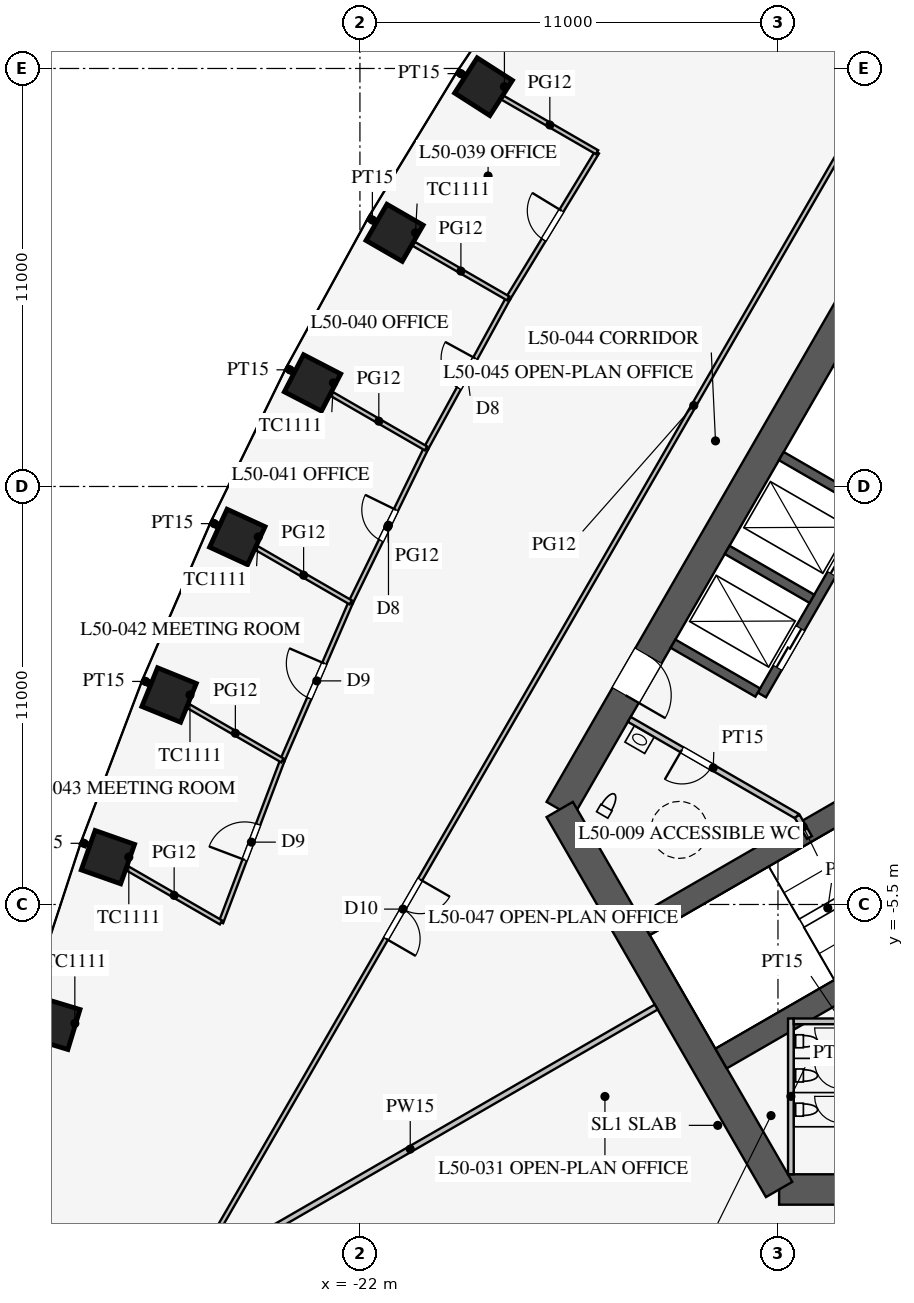
"""IFC4 building model, lengths in metres.
Left out: names, types, materials, properties, quantities, classifications, styles, units other than length and angle.
Written with IfcOpenShell. Run it as: python <this file> out.ifc"""

import sys

from ifc_helpers import new_model, si_unit, direction, frame, frame_2d, origin, origin_2d, place, context, subcontext, project, spatial, rectangle, extrude, element, fill, save


model = new_model("IFC4")
c1 = context("Model", 3, precision=1e-05, world=origin(), true_north=direction((0.0, 1.0)))
c2 = subcontext(c1, "Body", "Model", "MODEL_VIEW")
j1 = project(units=[si_unit("LENGTHUNIT", "METRE"), si_unit("PLANEANGLEUNIT", "RADIAN")], contexts=[c1])
p1 = place(None, origin())
s1 = spatial("IfcSite", under=j1, at=p1, CompositionType="ELEMENT")
p2 = place(p1, origin())
s2 = spatial("IfcBuilding", under=s1, at=p2, CompositionType="ELEMENT")
p3 = place(p2, frame((0.0, 0.0, 219.1)))
s3 = spatial("IfcBuildingStorey", under=s2, at=p3, CompositionType="ELEMENT", Elevation=219.1)
for number, where, z_axis, x_axis in (
    (1, (-18.748, 16.02, 0.0), (0.0, 0.0, 1.0), (-0.539, -0.842, 0.0)),
    (2, (-21.088, 12.175, 0.0), (0.0, 0.0, 1.0), (-0.5, -0.866, 0.0)),
    (3, (-23.248, 8.226, 0.0), (0.0, 0.0, 1.0), (-0.46, -0.888, 0.0)),
    (4, (-25.227, 4.172, 0.0), (0.0, 0.0, 1.0), (-0.418, -0.908, 0.0)),
    (5, (-27.022, 0.013, 0.0), (0.0, 0.0, 1.0), (-0.376, -0.927, 0.0)),
    (6, (-28.632, -4.254, 0.0), (0.0, 0.0, 1.0), (-0.332, -0.943, 0.0)),
    (7, (-30.052, -8.63, 0.0), (0.0, 0.0, 1.0), (-0.29, -0.957, 0.0)),
):
    element("IfcColumn", number, at=place(p3, frame(where, z_axis=z_axis, x_axis=x_axis)), inside=s3, PredefinedType="COLUMN", context=c2, shape_type="SweptSolid", body=[
        extrude(rectangle(XDim=1.1, YDim=1.1, at=origin_2d()), origin(), (0.0, 0.0, 1.0), 4.2),
    ])
p4 = place(p3, frame((-10.97, -13.0, 0.0), z_axis=(0.0, 0.0, 1.0), x_axis=(1.0, 0.0, 0.0)))
e8 = element("IfcWall", 8, at=p4, inside=s3, PredefinedType="SHEAR", context=c2, shape_type="SweptSolid", body=[
    extrude(rectangle(XDim=21.939, YDim=0.8, at=frame_2d((10.97, 0.0))), origin(), (0.0, 0.0, 1.0), 4.2),
])
p5 = place(p4, frame((17.27, 0.0, 0.0)))
e9 = element("IfcOpeningElement", 9, at=p5, cuts=e8, PredefinedType="OPENING", context=c2, shape_type="SweptSolid", body=[
    extrude(rectangle(XDim=1.2, YDim=2.1, at=frame_2d((0.6, 1.05))), frame((0.0, 0.41, 0.0), z_axis=(0.0, -1.0, 0.0), x_axis=(1.0, 0.0, 0.0)), (0.0, 0.0, 1.0), 0.82),
])
p6 = place(p4, frame((3.47, 0.0, 0.0)))
e10 = element("IfcOpeningElement", 10, at=p6, cuts=e8, PredefinedType="OPENING", context=c2, shape_type="SweptSolid", body=[
    extrude(rectangle(XDim=1.2, YDim=2.1, at=frame_2d((0.6, 1.05))), frame((0.0, 0.41, 0.0), z_axis=(0.0, -1.0, 0.0), x_axis=(1.0, 0.0, 0.0)), (0.0, 0.0, 1.0), 0.82),
])
p7 = place(p3, frame((-5.773, 16.0, 0.0), z_axis=(0.0, 0.0, 1.0), x_axis=(-0.500002442456, -0.866023993627, 0.0)))
e11 = element("IfcWall", 11, at=p7, inside=s3, PredefinedType="SHEAR", context=c2, shape_type="SweptSolid", body=[
    extrude(rectangle(XDim=21.939, YDim=0.8, at=frame_2d((10.97, 0.0))), origin(), (0.0, 0.0, 1.0), 4.2),
])
p8 = place(p7, frame((17.27, 0.0, 0.0)))
e12 = element("IfcOpeningElement", 12, at=p8, cuts=e11, PredefinedType="OPENING", context=c2, shape_type="SweptSolid", body=[
    extrude(rectangle(XDim=1.2, YDim=2.1, at=frame_2d((0.6, 1.05))), frame((0.0, 0.41, 0.0), z_axis=(0.0, -1.0, 0.0), x_axis=(1.0, 0.0, 0.0)), (0.0, 0.0, 1.0), 0.82),
])
p9 = place(p7, frame((3.47, 0.0, 0.0)))
e13 = element("IfcOpeningElement", 13, at=p9, cuts=e11, PredefinedType="OPENING", context=c2, shape_type="SweptSolid", body=[
    extrude(rectangle(XDim=1.2, YDim=2.1, at=frame_2d((0.6, 1.05))), frame((0.0, 0.41, 0.0), z_axis=(0.0, -1.0, 0.0), x_axis=(1.0, 0.0, 0.0)), (0.0, 0.0, 1.0), 0.82),
])
p10 = place(p3, frame((-16.743, -3.0, 0.0), z_axis=(0.0, 0.0, 1.0), x_axis=(0.499995765644, -0.866027848477, 0.0)))
e14 = element("IfcWall", 14, at=p10, inside=s3, PredefinedType="SHEAR", context=c2, shape_type="SweptSolid", body=[
    extrude(rectangle(XDim=11.547, YDim=0.8, at=frame_2d((5.773, 0.0))), origin(), (0.0, 0.0, 1.0), 4.2),
])
p11 = place(p3, frame((-5.724, 9.886, 0.0), z_axis=(0.0, 0.0, 1.0), x_axis=(-0.500001763848, -0.866024385424, 0.0)))
e15 = element("IfcWall", 15, at=p11, inside=s3, PredefinedType="SHEAR", context=c2, shape_type="SweptSolid", body=[
    extrude(rectangle(XDim=11.4, YDim=0.25, at=frame_2d((5.7, 0.0))), origin(), (0.0, 0.0, 1.0), 4.2),
])
p12 = place(p11, frame((6.525, 0.0, 0.0)))
e16 = element("IfcOpeningElement", 16, at=p12, cuts=e15, PredefinedType="OPENING", context=c2, shape_type="SweptSolid", body=[
    extrude(rectangle(XDim=1.2, YDim=2.2, at=frame_2d((0.6, 1.1))), frame((0.0, 0.135, 0.0), z_axis=(0.0, -1.0, 0.0), x_axis=(1.0, 0.0, 0.0)), (0.0, 0.0, 1.0), 0.27),
])
p13 = place(p11, frame((9.375, 0.0, 0.0)))
e17 = element("IfcOpeningElement", 17, at=p13, cuts=e15, PredefinedType="OPENING", context=c2, shape_type="SweptSolid", body=[
    extrude(rectangle(XDim=1.2, YDim=2.2, at=frame_2d((0.6, 1.1))), frame((0.0, 0.135, 0.0), z_axis=(0.0, -1.0, 0.0), x_axis=(1.0, 0.0, 0.0)), (0.0, 0.0, 1.0), 0.27),
])
for number, where, z_axis, x_axis in (
    (18, (-7.257, 7.481, 0.0), (0.0, 0.0, 1.0), (-0.866, 0.5, 0.0)),
    (19, (-8.682, 5.012, 0.0), (0.0, 0.0, 1.0), (-0.866, 0.5, 0.0)),
    (20, (-10.107, 2.544, 0.0), (0.0, 0.0, 1.0), (-0.866, 0.5, 0.0)),
    (21, (-11.532, 0.076, 0.0), (0.0, 0.0, 1.0), (-0.866, 0.5, 0.0)),
):
    element("IfcWall", number, at=place(p3, frame(where, z_axis=z_axis, x_axis=x_axis)), inside=s3, PredefinedType="SHEAR", context=c2, shape_type="SweptSolid", body=[
        extrude(rectangle(XDim=2.575, YDim=0.25, at=frame_2d((1.288, 0.0))), origin(), (0.0, 0.0, 1.0), 4.2),
    ])
for number, where, z_axis, x_axis in (
    (22, (-6.663, -1.509, 0.0), (0.0, 0.0, 1.0), (-0.866, -0.5, 0.0)),
    (23, (-4.638, -5.016, 0.0), (0.0, 0.0, 1.0), (-0.866, -0.5, 0.0)),
):
    element("IfcWall", number, at=place(p3, frame(where, z_axis=z_axis, x_axis=x_axis)), inside=s3, PredefinedType="SHEAR", context=c2, shape_type="SweptSolid", body=[
        extrude(rectangle(XDim=9.075, YDim=0.6, at=frame_2d((4.538, 0.0))), origin(), (0.0, 0.0, 1.0), 4.2),
    ])
p14 = place(p3, frame((-10.495, -3.178, 0.0), z_axis=(0.0, 0.0, 1.0), x_axis=(-0.86602216432, 0.500005610874, 0.0)))
e24 = element("IfcWall", 24, at=p14, inside=s3, PredefinedType="PARTITIONING", context=c2, shape_type="SweptSolid", body=[
    extrude(rectangle(XDim=5.1, YDim=0.15, at=frame_2d((2.55, 0.0))), origin(), (0.0, 0.0, 1.0), 4.0),
])
p15 = place(p14, frame((2.6, 0.0, 0.0)))
e25 = element("IfcOpeningElement", 25, at=p15, cuts=e24, PredefinedType="OPENING", context=c2, shape_type="SweptSolid", body=[
    extrude(rectangle(XDim=0.9, YDim=2.1, at=frame_2d((0.45, 1.05))), frame((0.0, 0.085, 0.0), z_axis=(0.0, -1.0, 0.0), x_axis=(1.0, 0.0, 0.0)), (0.0, 0.0, 1.0), 0.17),
])
p16 = place(p3, frame((-10.495, -3.178, 0.0), z_axis=(0.0, 0.0, 1.0), x_axis=(0.499842556608, -0.866116284689, 0.0)))
e26 = element("IfcWall", 26, at=p16, inside=s3, PredefinedType="PARTITIONING", context=c2, shape_type="SweptSolid", body=[
    extrude(rectangle(XDim=0.645, YDim=0.15, at=frame_2d((0.323, 0.0))), origin(), (0.0, 0.0, 1.0), 4.0),
])
p17 = place(p3, frame((-10.66, -8.5, 0.0), z_axis=(0.0, 0.0, 1.0), x_axis=(0.0, -1.0, 0.0)))
e27 = element("IfcWall", 27, at=p17, inside=s3, PredefinedType="PARTITIONING", context=c2, shape_type="SweptSolid", body=[
    extrude(rectangle(XDim=4.1, YDim=0.15, at=frame_2d((2.05, 0.0))), origin(), (0.0, 0.0, 1.0), 4.0),
])
p18 = place(p3, frame((-8.075, -8.575, 0.0), z_axis=(0.0, 0.0, 1.0), x_axis=(-1.0, 0.0, 0.0)))
e28 = element("IfcWall", 28, at=p18, inside=s3, PredefinedType="PARTITIONING", context=c2, shape_type="SweptSolid", body=[
    extrude(rectangle(XDim=2.51, YDim=0.15, at=frame_2d((1.255, 0.0))), origin(), (0.0, 0.0, 1.0), 4.0),
])
p19 = place(p3, frame((-14.203, -8.2, 0.0), z_axis=(0.0, 0.0, 1.0), x_axis=(-0.866021600284, -0.500006587798, 0.0)))
e29 = element("IfcWall", 29, at=p19, inside=s3, PredefinedType="PARTITIONING", context=c2, shape_type="SweptSolid", body=[
    extrude(rectangle(XDim=14.95, YDim=0.15, at=frame_2d((7.475, 0.0))), origin(), (0.0, 0.0, 1.0), 2.4),
])
p20 = place(p3, frame((-0.016, 30.491, 0.0), z_axis=(0.0, 0.0, 1.0), x_axis=(-0.50000091641, -0.866024874695, 0.0)))
e30 = element("IfcWall", 30, at=p20, inside=s3, PredefinedType="PARTITIONING", context=c2, shape_type="SweptSolid", body=[
    extrude(rectangle(XDim=52.796, YDim=0.12, at=frame_2d((26.398, 0.0))), origin(), (0.0, 0.0, 1.0), 2.9),
])
p21 = place(p20, frame((10.2, 0.0, 0.15)))
e31 = element("IfcOpeningElement", 31, at=p21, cuts=e30, PredefinedType="OPENING", context=c2, shape_type="SweptSolid", body=[
    extrude(rectangle(XDim=1.8, YDim=2.1, at=frame_2d((0.9, 1.05))), frame((0.0, 0.07, 0.0), z_axis=(0.0, -1.0, 0.0), x_axis=(1.0, 0.0, 0.0)), (0.0, 0.0, 1.0), 0.14),
])
p22 = place(p20, frame((40.8, 0.0, 0.15)))
e32 = element("IfcOpeningElement", 32, at=p22, cuts=e30, PredefinedType="OPENING", context=c2, shape_type="SweptSolid", body=[
    extrude(rectangle(XDim=1.8, YDim=2.1, at=frame_2d((0.9, 1.05))), frame((0.0, 0.07, 0.0), z_axis=(0.0, -1.0, 0.0), x_axis=(1.0, 0.0, 0.0)), (0.0, 0.0, 1.0), 0.14),
])
p23 = place(p3, frame((-21.568, 12.452, 0.0), z_axis=(0.0, 0.0, 1.0), x_axis=(-0.866303639744, 0.499517771221, 0.0)))
e33 = element("IfcWall", 33, at=p23, inside=s3, PredefinedType="PARTITIONING", context=c2, shape_type="SweptSolid", body=[
    extrude(rectangle(XDim=0.241, YDim=0.15, at=frame_2d((0.121, 0.0))), origin(), (0.0, 0.0, 1.0), 2.9),
])
p24 = place(p3, frame((-27.563, 0.325, 0.0), z_axis=(0.0, 0.0, 1.0), x_axis=(-0.865614066289, 0.500711781609, 0.0)))
e34 = element("IfcWall", 34, at=p24, inside=s3, PredefinedType="PARTITIONING", context=c2, shape_type="SweptSolid", body=[
    extrude(rectangle(XDim=0.178, YDim=0.15, at=frame_2d((0.089, 0.0))), origin(), (0.0, 0.0, 1.0), 2.9),
])
p25 = place(p3, frame((-29.191, -3.931, 0.0), z_axis=(0.0, 0.0, 1.0), x_axis=(-0.866484919499, 0.499203249469, 0.0)))
e35 = element("IfcWall", 35, at=p25, inside=s3, PredefinedType="PARTITIONING", context=c2, shape_type="SweptSolid", body=[
    extrude(rectangle(XDim=0.163, YDim=0.15, at=frame_2d((0.082, 0.0))), origin(), (0.0, 0.0, 1.0), 2.9),
])
p26 = place(p3, frame((-23.749, 8.515, 0.0), z_axis=(0.0, 0.0, 1.0), x_axis=(-0.865810949009, 0.500371262739, 0.0)))
e36 = element("IfcWall", 36, at=p26, inside=s3, PredefinedType="PARTITIONING", context=c2, shape_type="SweptSolid", body=[
    extrude(rectangle(XDim=0.217, YDim=0.15, at=frame_2d((0.108, 0.0))), origin(), (0.0, 0.0, 1.0), 2.9),
])
p27 = place(p3, frame((-25.748, 4.473, 0.0), z_axis=(0.0, 0.0, 1.0), x_axis=(-0.865625187776, 0.500692554656, 0.0)))
e37 = element("IfcWall", 37, at=p27, inside=s3, PredefinedType="PARTITIONING", context=c2, shape_type="SweptSolid", body=[
    extrude(rectangle(XDim=0.196, YDim=0.15, at=frame_2d((0.098, 0.0))), origin(), (0.0, 0.0, 1.0), 2.9),
])
p28 = place(p3, frame((-19.249, 16.31, 0.0), z_axis=(0.0, 0.0, 1.0), x_axis=(-0.865810949009, 0.500371262739, 0.0)))
e38 = element("IfcWall", 38, at=p28, inside=s3, PredefinedType="PARTITIONING", context=c2, shape_type="SweptSolid", body=[
    extrude(rectangle(XDim=0.217, YDim=0.15, at=frame_2d((0.108, 0.0))), origin(), (0.0, 0.0, 1.0), 2.9),
])
p29 = place(p3, frame((-18.101, 10.45, 0.0), z_axis=(0.0, 0.0, 1.0), x_axis=(-0.479949984371, -0.877295852322, 0.0)))
e39 = element("IfcWall", 39, at=p29, inside=s3, PredefinedType="PARTITIONING", context=c2, shape_type="SweptSolid", body=[
    extrude(rectangle(XDim=4.501, YDim=0.12, at=frame_2d((2.25, 0.0))), origin(), (0.0, 0.0, 1.0), 2.9),
])
p30 = place(p29, frame((1.8, 0.0, 0.15)))
e40 = element("IfcOpeningElement", 40, at=p30, cuts=e39, PredefinedType="OPENING", context=c2, shape_type="SweptSolid", body=[
    extrude(rectangle(XDim=0.9, YDim=2.1, at=frame_2d((0.45, 1.05))), frame((0.0, 0.07, 0.0), z_axis=(0.0, -1.0, 0.0), x_axis=(1.0, 0.0, 0.0)), (0.0, 0.0, 1.0), 0.14),
])
p31 = place(p3, frame((-24.041, -1.708, 0.0), z_axis=(0.0, 0.0, 1.0), x_axis=(-0.3542667952, -0.935144394101, 0.0)))
e41 = element("IfcWall", 41, at=p31, inside=s3, PredefinedType="PARTITIONING", context=c2, shape_type="SweptSolid", body=[
    extrude(rectangle(XDim=4.559, YDim=0.12, at=frame_2d((2.28, 0.0))), origin(), (0.0, 0.0, 1.0), 2.9),
])
p32 = place(p31, frame((1.8, 0.0, 0.15)))
e42 = element("IfcOpeningElement", 42, at=p32, cuts=e41, PredefinedType="OPENING", context=c2, shape_type="SweptSolid", body=[
    extrude(rectangle(XDim=1.0, YDim=2.1, at=frame_2d((0.5, 1.05))), frame((0.0, 0.07, 0.0), z_axis=(0.0, -1.0, 0.0), x_axis=(1.0, 0.0, 0.0)), (0.0, 0.0, 1.0), 0.14),
])
p33 = place(p3, frame((-20.261, 6.501, 0.0), z_axis=(0.0, 0.0, 1.0), x_axis=(-0.43911984878, -0.898428493764, 0.0)))
e43 = element("IfcWall", 43, at=p33, inside=s3, PredefinedType="PARTITIONING", context=c2, shape_type="SweptSolid", body=[
    extrude(rectangle(XDim=4.511, YDim=0.12, at=frame_2d((2.255, 0.0))), origin(), (0.0, 0.0, 1.0), 2.9),
])
p34 = place(p33, frame((1.8, 0.0, 0.15)))
e44 = element("IfcOpeningElement", 44, at=p34, cuts=e43, PredefinedType="OPENING", context=c2, shape_type="SweptSolid", body=[
    extrude(rectangle(XDim=0.9, YDim=2.1, at=frame_2d((0.45, 1.05))), frame((0.0, 0.07, 0.0), z_axis=(0.0, -1.0, 0.0), x_axis=(1.0, 0.0, 0.0)), (0.0, 0.0, 1.0), 0.14),
])
p35 = place(p3, frame((-22.242, 2.449, 0.0), z_axis=(0.0, 0.0, 1.0), x_axis=(-0.397208101111, -0.917728567939, 0.0)))
e45 = element("IfcWall", 45, at=p35, inside=s3, PredefinedType="PARTITIONING", context=c2, shape_type="SweptSolid", body=[
    extrude(rectangle(XDim=4.53, YDim=0.12, at=frame_2d((2.265, 0.0))), origin(), (0.0, 0.0, 1.0), 2.9),
])
p36 = place(p35, frame((1.75, 0.0, 0.15)))
e46 = element("IfcOpeningElement", 46, at=p36, cuts=e45, PredefinedType="OPENING", context=c2, shape_type="SweptSolid", body=[
    extrude(rectangle(XDim=1.0, YDim=2.1, at=frame_2d((0.5, 1.05))), frame((0.0, 0.07, 0.0), z_axis=(0.0, -1.0, 0.0), x_axis=(1.0, 0.0, 0.0)), (0.0, 0.0, 1.0), 0.14),
])
p37 = place(p3, frame((-15.761, 14.296, 0.0), z_axis=(0.0, 0.0, 1.0), x_axis=(-0.519790350351, -0.85429385558, 0.0)))
e47 = element("IfcWall", 47, at=p37, inside=s3, PredefinedType="PARTITIONING", context=c2, shape_type="SweptSolid", body=[
    extrude(rectangle(XDim=4.501, YDim=0.12, at=frame_2d((2.25, 0.0))), origin(), (0.0, 0.0, 1.0), 2.9),
])
p38 = place(p37, frame((1.8, 0.0, 0.15)))
e48 = element("IfcOpeningElement", 48, at=p38, cuts=e47, PredefinedType="OPENING", context=c2, shape_type="SweptSolid", body=[
    extrude(rectangle(XDim=0.9, YDim=2.1, at=frame_2d((0.45, 1.05))), frame((0.0, 0.07, 0.0), z_axis=(0.0, -1.0, 0.0), x_axis=(1.0, 0.0, 0.0)), (0.0, 0.0, 1.0), 0.14),
])
p39 = place(p3, frame((-18.101, 10.45, 0.0), z_axis=(0.0, 0.0, 1.0), x_axis=(-0.866041086612, 0.499972835562, 0.0)))
e49 = element("IfcWall", 49, at=p39, inside=s3, PredefinedType="PARTITIONING", context=c2, shape_type="SweptSolid", body=[
    extrude(rectangle(XDim=2.87, YDim=0.12, at=frame_2d((1.435, 0.0))), origin(), (0.0, 0.0, 1.0), 2.9),
])
p40 = place(p3, frame((-24.041, -1.708, 0.0), z_axis=(0.0, 0.0, 1.0), x_axis=(-0.86605750902, 0.499944387978, 0.0)))
e50 = element("IfcWall", 50, at=p40, inside=s3, PredefinedType="PARTITIONING", context=c2, shape_type="SweptSolid", body=[
    extrude(rectangle(XDim=2.857, YDim=0.12, at=frame_2d((1.428, 0.0))), origin(), (0.0, 0.0, 1.0), 2.9),
])
p41 = place(p3, frame((-25.656, -5.972, 0.0), z_axis=(0.0, 0.0, 1.0), x_axis=(-0.866022741256, 0.500004611607, 0.0)))
e51 = element("IfcWall", 51, at=p41, inside=s3, PredefinedType="PARTITIONING", context=c2, shape_type="SweptSolid", body=[
    extrude(rectangle(XDim=2.846, YDim=0.12, at=frame_2d((1.423, 0.0))), origin(), (0.0, 0.0, 1.0), 2.9),
])
p42 = place(p3, frame((-20.261, 6.501, 0.0), z_axis=(0.0, 0.0, 1.0), x_axis=(-0.866008413041, 0.500029427677, 0.0)))
e52 = element("IfcWall", 52, at=p42, inside=s3, PredefinedType="PARTITIONING", context=c2, shape_type="SweptSolid", body=[
    extrude(rectangle(XDim=2.868, YDim=0.12, at=frame_2d((1.434, 0.0))), origin(), (0.0, 0.0, 1.0), 2.9),
])
p43 = place(p3, frame((-22.242, 2.449, 0.0), z_axis=(0.0, 0.0, 1.0), x_axis=(-0.866020927947, 0.500007752297, 0.0)))
e53 = element("IfcWall", 53, at=p43, inside=s3, PredefinedType="PARTITIONING", context=c2, shape_type="SweptSolid", body=[
    extrude(rectangle(XDim=2.864, YDim=0.12, at=frame_2d((1.432, 0.0))), origin(), (0.0, 0.0, 1.0), 2.9),
])
p44 = place(p3, frame((-15.761, 14.296, 0.0), z_axis=(0.0, 0.0, 1.0), x_axis=(-0.866008413041, 0.500029427677, 0.0)))
e54 = element("IfcWall", 54, at=p44, inside=s3, PredefinedType="PARTITIONING", context=c2, shape_type="SweptSolid", body=[
    extrude(rectangle(XDim=2.868, YDim=0.12, at=frame_2d((1.434, 0.0))), origin(), (0.0, 0.0, 1.0), 2.9),
])
p45 = place(p15, origin())
e55 = element("IfcDoor", 55, at=p45, inside=s3, OperationType="SINGLE_SWING_RIGHT", PredefinedType="DOOR", context=c2, shape_type="SweptSolid", body=[
    extrude(rectangle(XDim=0.9, YDim=2.1, at=frame_2d((0.45, 1.05))), frame((0.0, 0.025, 0.0), z_axis=(0.0, -1.0, 0.0), x_axis=(1.0, 0.0, 0.0)), (0.0, 0.0, 1.0), 0.05),
])
fill(e25, e55)
p46 = place(p8, origin())
e56 = element("IfcDoor", 56, at=p46, inside=s3, OperationType="SINGLE_SWING_RIGHT", PredefinedType="DOOR", context=c2, shape_type="SweptSolid", body=[
    extrude(rectangle(XDim=1.2, YDim=2.1, at=frame_2d((0.6, 1.05))), frame((0.0, 0.025, 0.0), z_axis=(0.0, -1.0, 0.0), x_axis=(1.0, 0.0, 0.0)), (0.0, 0.0, 1.0), 0.05),
])
fill(e12, e56)
p47 = place(p38, frame((0.9, 0.0, 0.0), z_axis=(0.0, 0.0, 1.0), x_axis=(-1.0, 0.0, 0.0)))
e57 = element("IfcDoor", 57, at=p47, inside=s3, OperationType="SINGLE_SWING_RIGHT", PredefinedType="DOOR", context=c2, shape_type="SweptSolid", body=[
    extrude(rectangle(XDim=0.9, YDim=2.1, at=frame_2d((0.45, 1.05))), frame((0.0, 0.025, 0.0), z_axis=(0.0, -1.0, 0.0), x_axis=(1.0, 0.0, 0.0)), (0.0, 0.0, 1.0), 0.05),
])
fill(e48, e57)
p48 = place(p30, frame((0.9, 0.0, 0.0), z_axis=(0.0, 0.0, 1.0), x_axis=(-1.0, 0.0, 0.0)))
e58 = element("IfcDoor", 58, at=p48, inside=s3, OperationType="SINGLE_SWING_RIGHT", PredefinedType="DOOR", context=c2, shape_type="SweptSolid", body=[
    extrude(rectangle(XDim=0.9, YDim=2.1, at=frame_2d((0.45, 1.05))), frame((0.0, 0.025, 0.0), z_axis=(0.0, -1.0, 0.0), x_axis=(1.0, 0.0, 0.0)), (0.0, 0.0, 1.0), 0.05),
])
fill(e40, e58)
p49 = place(p34, frame((0.9, 0.0, 0.0), z_axis=(0.0, 0.0, 1.0), x_axis=(-1.0, 0.0, 0.0)))
e59 = element("IfcDoor", 59, at=p49, inside=s3, OperationType="SINGLE_SWING_RIGHT", PredefinedType="DOOR", context=c2, shape_type="SweptSolid", body=[
    extrude(rectangle(XDim=0.9, YDim=2.1, at=frame_2d((0.45, 1.05))), frame((0.0, 0.025, 0.0), z_axis=(0.0, -1.0, 0.0), x_axis=(1.0, 0.0, 0.0)), (0.0, 0.0, 1.0), 0.05),
])
fill(e44, e59)
p50 = place(p36, frame((1.0, 0.0, 0.0), z_axis=(0.0, 0.0, 1.0), x_axis=(-1.0, 0.0, 0.0)))
e60 = element("IfcDoor", 60, at=p50, inside=s3, OperationType="SINGLE_SWING_RIGHT", PredefinedType="DOOR", context=c2, shape_type="SweptSolid", body=[
    extrude(rectangle(XDim=1.0, YDim=2.1, at=frame_2d((0.5, 1.05))), frame((0.0, 0.025, 0.0), z_axis=(0.0, -1.0, 0.0), x_axis=(1.0, 0.0, 0.0)), (0.0, 0.0, 1.0), 0.05),
])
fill(e46, e60)
p51 = place(p32, frame((1.0, 0.0, 0.0), z_axis=(0.0, 0.0, 1.0), x_axis=(-1.0, 0.0, 0.0)))
e61 = element("IfcDoor", 61, at=p51, inside=s3, OperationType="SINGLE_SWING_LEFT", PredefinedType="DOOR", context=c2, shape_type="SweptSolid", body=[
    extrude(rectangle(XDim=1.0, YDim=2.1, at=frame_2d((0.5, 1.05))), frame((0.0, 0.025, 0.0), z_axis=(0.0, -1.0, 0.0), x_axis=(1.0, 0.0, 0.0)), (0.0, 0.0, 1.0), 0.05),
])
fill(e42, e61)
p52 = place(p22, origin())
e62 = element("IfcDoor", 62, at=p52, inside=s3, OperationType="DOUBLE_DOOR_SINGLE_SWING", PredefinedType="DOOR", context=c2, shape_type="SweptSolid", body=[
    extrude(rectangle(XDim=1.8, YDim=2.1, at=frame_2d((0.9, 1.05))), frame((0.0, 0.025, 0.0), z_axis=(0.0, -1.0, 0.0), x_axis=(1.0, 0.0, 0.0)), (0.0, 0.0, 1.0), 0.05),
])
fill(e32, e62)
p53 = place(p12, origin())
e63 = element("IfcDoor", 63, at=p53, inside=s3, OperationType="DOUBLE_DOOR_SLIDING", PredefinedType="DOOR", context=c2, shape_type="SweptSolid", body=[
    extrude(rectangle(XDim=1.2, YDim=2.2, at=frame_2d((0.6, 1.1))), frame((0.0, 0.025, 0.0), z_axis=(0.0, -1.0, 0.0), x_axis=(1.0, 0.0, 0.0)), (0.0, 0.0, 1.0), 0.05),
])
fill(e16, e63)
p54 = place(p13, origin())
e64 = element("IfcDoor", 64, at=p54, inside=s3, OperationType="DOUBLE_DOOR_SLIDING", PredefinedType="DOOR", context=c2, shape_type="SweptSolid", body=[
    extrude(rectangle(XDim=1.2, YDim=2.2, at=frame_2d((0.6, 1.1))), frame((0.0, 0.025, 0.0), z_axis=(0.0, -1.0, 0.0), x_axis=(1.0, 0.0, 0.0)), (0.0, 0.0, 1.0), 0.05),
])
fill(e17, e64)
save(model, sys.argv[1])
